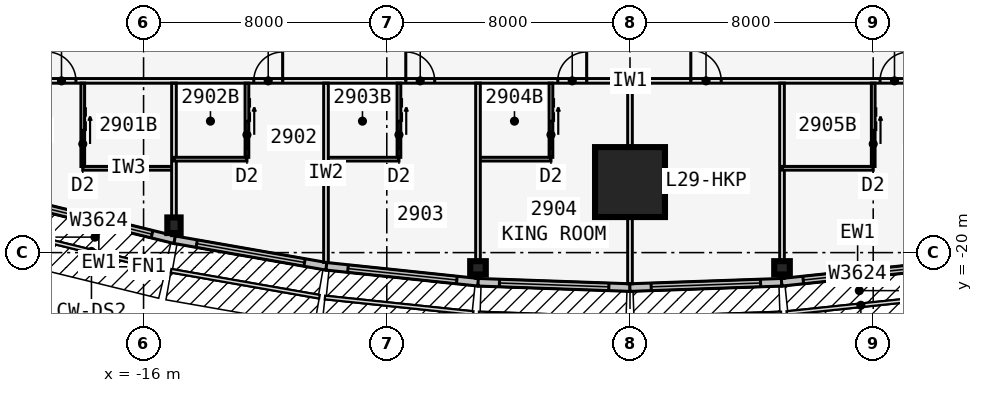
"""IFC4 building model, lengths in metres.
Left out: names, types, materials, properties, quantities, classifications, styles, units other than length and angle.
Written with IfcOpenShell. Run it as: python <this file> out.ifc"""

import sys

from ifc_helpers import new_model, si_unit, direction, frame, frame_2d, origin, origin_2d, place, context, subcontext, project, spatial, rectangle, i_section, extrude, element, fill, save


model = new_model("IFC4")
c1 = context("Model", 3, precision=1e-05, world=origin(), true_north=direction((0.0, 1.0)))
c2 = subcontext(c1, "Body", "Model", "MODEL_VIEW")
j1 = project(units=[si_unit("LENGTHUNIT", "METRE"), si_unit("PLANEANGLEUNIT", "RADIAN")], contexts=[c1])
p1 = place(None, origin())
s1 = spatial("IfcSite", under=j1, at=p1, CompositionType="ELEMENT")
p2 = place(p1, origin())
s2 = spatial("IfcBuilding", under=s1, at=p2, CompositionType="ELEMENT")
p3 = place(p2, frame((0.0, 0.0, 114.7)))
s3 = spatial("IfcBuildingStorey", under=s2, at=p3, CompositionType="ELEMENT", Elevation=114.7)
for number, where, z_axis, x_axis in (
    (1, (-15.0, -19.1, 0.0), (0.0, 0.0, 1.0), (1.0, 0.0, 0.0)),
    (2, (-5.0, -20.5, 0.0), (0.0, 0.0, 1.0), (0.0, -1.0, 0.0)),
    (3, (5.0, -20.5, 0.0), (0.0, 0.0, 1.0), (0.0, -1.0, 0.0)),
):
    element("IfcColumn", number, at=place(p3, frame(where, z_axis=z_axis, x_axis=x_axis)), inside=s3, PredefinedType="COLUMN", context=c2, shape_type="SweptSolid", body=[
        extrude(i_section(OverallWidth=0.437, OverallDepth=0.513, WebThickness=0.061, FlangeThickness=0.097, at=origin_2d()), origin(), (0.0, 0.0, 1.0), 3.4),
    ])
p4 = place(p3, frame((0.0, -17.68, 0.0), z_axis=(0.0, 0.0, 1.0), x_axis=(0.0, -1.0, 0.0)))
e4 = element("IfcColumn", 4, at=p4, inside=s3, PredefinedType="COLUMN", context=c2, shape_type="SweptSolid", body=[
    extrude(rectangle(XDim=2.3, YDim=2.3, at=origin_2d()), origin(), (0.0, 0.0, 1.0), 3.4),
])
p5 = place(p3, frame((-19.97, -18.354, 0.0), z_axis=(0.0, 0.0, 1.0), x_axis=(0.971270024053, -0.237980126011, 0.0)))
e5 = element("IfcWall", 5, at=p5, inside=s3, PredefinedType="STANDARD", context=c2, shape_type="SweptSolid", body=[
    extrude(rectangle(XDim=5.148, YDim=0.25, at=frame_2d((2.574, 0.0))), origin(), (0.0, 0.0, 1.0), 3.235),
])
p6 = place(p5, frame((0.774, 0.0, 0.45)))
e6 = element("IfcOpeningElement", 6, at=p6, cuts=e5, PredefinedType="OPENING", context=c2, shape_type="SweptSolid", body=[
    extrude(rectangle(XDim=3.6, YDim=2.4, at=frame_2d((1.8, 1.2))), frame((0.0, 0.135, 0.0), z_axis=(0.0, -1.0, 0.0), x_axis=(1.0, 0.0, 0.0)), (0.0, 0.0, 1.0), 0.27),
])
p7 = place(p3, frame((-14.979, -19.577, 0.0), z_axis=(0.0, 0.0, 1.0), x_axis=(0.985030467156, -0.172380331752, 0.0)))
e7 = element("IfcWall", 7, at=p7, inside=s3, PredefinedType="STANDARD", context=c2, shape_type="SweptSolid", body=[
    extrude(rectangle(XDim=5.076, YDim=0.25, at=frame_2d((2.538, 0.0))), origin(), (0.0, 0.0, 1.0), 3.235),
])
p8 = place(p7, frame((0.738, 0.0, 0.45)))
e8 = element("IfcOpeningElement", 8, at=p8, cuts=e7, PredefinedType="OPENING", context=c2, shape_type="SweptSolid", body=[
    extrude(rectangle(XDim=3.6, YDim=2.4, at=frame_2d((1.8, 1.2))), frame((0.0, 0.135, 0.0), z_axis=(0.0, -1.0, 0.0), x_axis=(1.0, 0.0, 0.0)), (0.0, 0.0, 1.0), 0.27),
])
p9 = place(p3, frame((-9.987, -20.451, 0.0), z_axis=(0.0, 0.0, 1.0), x_axis=(0.994534683851, -0.104406717299, 0.0)))
e9 = element("IfcWall", 9, at=p9, inside=s3, PredefinedType="STANDARD", context=c2, shape_type="SweptSolid", body=[
    extrude(rectangle(XDim=5.028, YDim=0.25, at=frame_2d((2.514, 0.0))), origin(), (0.0, 0.0, 1.0), 3.235),
])
p10 = place(p9, frame((0.714, 0.0, 0.45)))
e10 = element("IfcOpeningElement", 10, at=p10, cuts=e9, PredefinedType="OPENING", context=c2, shape_type="SweptSolid", body=[
    extrude(rectangle(XDim=3.6, YDim=2.4, at=frame_2d((1.8, 1.2))), frame((0.0, 0.135, 0.0), z_axis=(0.0, -1.0, 0.0), x_axis=(1.0, 0.0, 0.0)), (0.0, 0.0, 1.0), 0.27),
])
p11 = place(p3, frame((-4.996, -20.975, 0.0), z_axis=(0.0, 0.0, 1.0), x_axis=(0.999387720943, -0.034988329879, 0.0)))
e11 = element("IfcWall", 11, at=p11, inside=s3, PredefinedType="STANDARD", context=c2, shape_type="SweptSolid", body=[
    extrude(rectangle(XDim=5.003, YDim=0.25, at=frame_2d((2.501, 0.0))), origin(), (0.0, 0.0, 1.0), 3.235),
])
p12 = place(p11, frame((0.701, 0.0, 0.45)))
e12 = element("IfcOpeningElement", 12, at=p12, cuts=e11, PredefinedType="OPENING", context=c2, shape_type="SweptSolid", body=[
    extrude(rectangle(XDim=3.6, YDim=2.4, at=frame_2d((1.8, 1.2))), frame((0.0, 0.135, 0.0), z_axis=(0.0, -1.0, 0.0), x_axis=(1.0, 0.0, 0.0)), (0.0, 0.0, 1.0), 0.27),
])
p13 = place(p3, frame((-0.004, -21.15, 0.0), z_axis=(0.0, 0.0, 1.0), x_axis=(0.999387720943, 0.034988329879, 0.0)))
e13 = element("IfcWall", 13, at=p13, inside=s3, PredefinedType="STANDARD", context=c2, shape_type="SweptSolid", body=[
    extrude(rectangle(XDim=5.003, YDim=0.25, at=frame_2d((2.501, 0.0))), origin(), (0.0, 0.0, 1.0), 3.235),
])
p14 = place(p13, frame((0.701, 0.0, 0.45)))
e14 = element("IfcOpeningElement", 14, at=p14, cuts=e13, PredefinedType="OPENING", context=c2, shape_type="SweptSolid", body=[
    extrude(rectangle(XDim=3.6, YDim=2.4, at=frame_2d((1.8, 1.2))), frame((0.0, 0.135, 0.0), z_axis=(0.0, -1.0, 0.0), x_axis=(1.0, 0.0, 0.0)), (0.0, 0.0, 1.0), 0.27),
])
p15 = place(p3, frame((4.987, -20.976, 0.0), z_axis=(0.0, 0.0, 1.0), x_axis=(0.994534683851, 0.104406717299, 0.0)))
e15 = element("IfcWall", 15, at=p15, inside=s3, PredefinedType="STANDARD", context=c2, shape_type="SweptSolid", body=[
    extrude(rectangle(XDim=5.028, YDim=0.25, at=frame_2d((2.514, 0.0))), origin(), (0.0, 0.0, 1.0), 3.235),
])
p16 = place(p15, frame((0.714, 0.0, 0.45)))
e16 = element("IfcOpeningElement", 16, at=p16, cuts=e15, PredefinedType="OPENING", context=c2, shape_type="SweptSolid", body=[
    extrude(rectangle(XDim=3.6, YDim=2.4, at=frame_2d((1.8, 1.2))), frame((0.0, 0.135, 0.0), z_axis=(0.0, -1.0, 0.0), x_axis=(1.0, 0.0, 0.0)), (0.0, 0.0, 1.0), 0.27),
])
p17 = place(p3, frame((-23.857, -14.351, 0.0), z_axis=(0.0, 0.0, 1.0), x_axis=(1.0, 0.0, 0.0)))
e17 = element("IfcWall", 17, at=p17, inside=s3, PredefinedType="PARTITIONING", context=c2, shape_type="SweptSolid", body=[
    extrude(rectangle(XDim=47.714, YDim=0.15, at=frame_2d((23.857, 0.0))), origin(), (0.0, 0.0, 1.0), 3.235),
])
p18 = place(p17, frame((4.682, 0.0, 0.0)))
e18 = element("IfcOpeningElement", 18, at=p18, cuts=e17, PredefinedType="OPENING", context=c2, shape_type="SweptSolid", body=[
    extrude(rectangle(XDim=0.95, YDim=2.13, at=frame_2d((0.475, 1.065))), frame((0.0, 0.085, 0.0), z_axis=(0.0, -1.0, 0.0), x_axis=(1.0, 0.0, 0.0)), (0.0, 0.0, 1.0), 0.17),
])
p19 = place(p17, frame((11.482, 0.0, 0.0)))
e19 = element("IfcOpeningElement", 19, at=p19, cuts=e17, PredefinedType="OPENING", context=c2, shape_type="SweptSolid", body=[
    extrude(rectangle(XDim=0.95, YDim=2.13, at=frame_2d((0.475, 1.065))), frame((0.0, 0.085, 0.0), z_axis=(0.0, -1.0, 0.0), x_axis=(1.0, 0.0, 0.0)), (0.0, 0.0, 1.0), 0.17),
])
p20 = place(p17, frame((16.482, 0.0, 0.0)))
e20 = element("IfcOpeningElement", 20, at=p20, cuts=e17, PredefinedType="OPENING", context=c2, shape_type="SweptSolid", body=[
    extrude(rectangle(XDim=0.95, YDim=2.13, at=frame_2d((0.475, 1.065))), frame((0.0, 0.085, 0.0), z_axis=(0.0, -1.0, 0.0), x_axis=(1.0, 0.0, 0.0)), (0.0, 0.0, 1.0), 0.17),
])
p21 = place(p17, frame((21.482, 0.0, 0.0)))
e21 = element("IfcOpeningElement", 21, at=p21, cuts=e17, PredefinedType="OPENING", context=c2, shape_type="SweptSolid", body=[
    extrude(rectangle(XDim=0.95, YDim=2.13, at=frame_2d((0.475, 1.065))), frame((0.0, 0.085, 0.0), z_axis=(0.0, -1.0, 0.0), x_axis=(1.0, 0.0, 0.0)), (0.0, 0.0, 1.0), 0.17),
])
p22 = place(p17, frame((25.857, 0.0, 0.0)))
e22 = element("IfcOpeningElement", 22, at=p22, cuts=e17, PredefinedType="OPENING", context=c2, shape_type="SweptSolid", body=[
    extrude(rectangle(XDim=1.0, YDim=2.13, at=frame_2d((0.5, 1.065))), frame((0.0, 0.085, 0.0), z_axis=(0.0, -1.0, 0.0), x_axis=(1.0, 0.0, 0.0)), (0.0, 0.0, 1.0), 0.17),
])
p23 = place(p17, frame((32.082, 0.0, 0.0)))
e23 = element("IfcOpeningElement", 23, at=p23, cuts=e17, PredefinedType="OPENING", context=c2, shape_type="SweptSolid", body=[
    extrude(rectangle(XDim=0.95, YDim=2.13, at=frame_2d((0.475, 1.065))), frame((0.0, 0.085, 0.0), z_axis=(0.0, -1.0, 0.0), x_axis=(1.0, 0.0, 0.0)), (0.0, 0.0, 1.0), 0.17),
])
p24 = place(p17, frame((42.082, 0.0, 0.0)))
e24 = element("IfcOpeningElement", 24, at=p24, cuts=e17, PredefinedType="OPENING", context=c2, shape_type="SweptSolid", body=[
    extrude(rectangle(XDim=0.95, YDim=2.13, at=frame_2d((0.475, 1.065))), frame((0.0, 0.085, 0.0), z_axis=(0.0, -1.0, 0.0), x_axis=(1.0, 0.0, 0.0)), (0.0, 0.0, 1.0), 0.17),
])
p25 = place(p3, frame((-15.0, -14.426, 0.0), z_axis=(0.0, 0.0, 1.0), x_axis=(0.0, -1.0, 0.0)))
e25 = element("IfcWall", 25, at=p25, inside=s3, PredefinedType="PARTITIONING", context=c2, shape_type="SweptSolid", body=[
    extrude(rectangle(XDim=5.017, YDim=0.15, at=frame_2d((2.508, 0.0))), origin(), (0.0, 0.0, 1.0), 2.389),
])
p26 = place(p3, frame((-10.0, -14.426, 0.0), z_axis=(0.0, 0.0, 1.0), x_axis=(0.0, -1.0, 0.0)))
e26 = element("IfcWall", 26, at=p26, inside=s3, PredefinedType="PARTITIONING", context=c2, shape_type="SweptSolid", body=[
    extrude(rectangle(XDim=5.895, YDim=0.15, at=frame_2d((2.948, 0.0))), origin(), (0.0, 0.0, 1.0), 2.389),
])
p27 = place(p3, frame((-5.0, -14.426, 0.0), z_axis=(0.0, 0.0, 1.0), x_axis=(0.0, -1.0, 0.0)))
e27 = element("IfcWall", 27, at=p27, inside=s3, PredefinedType="PARTITIONING", context=c2, shape_type="SweptSolid", body=[
    extrude(rectangle(XDim=6.423, YDim=0.15, at=frame_2d((3.211, 0.0))), origin(), (0.0, 0.0, 1.0), 2.389),
])
p28 = place(p3, frame((0.0, -14.426, 0.0), z_axis=(0.0, 0.0, 1.0), x_axis=(0.0, -1.0, 0.0)))
e28 = element("IfcWall", 28, at=p28, inside=s3, PredefinedType="PARTITIONING", context=c2, shape_type="SweptSolid", body=[
    extrude(rectangle(XDim=6.599, YDim=0.15, at=frame_2d((3.299, 0.0))), origin(), (0.0, 0.0, 1.0), 2.389),
])
p29 = place(p3, frame((5.0, -14.426, 0.0), z_axis=(0.0, 0.0, 1.0), x_axis=(0.0, -1.0, 0.0)))
e29 = element("IfcWall", 29, at=p29, inside=s3, PredefinedType="PARTITIONING", context=c2, shape_type="SweptSolid", body=[
    extrude(rectangle(XDim=6.423, YDim=0.15, at=frame_2d((3.211, 0.0))), origin(), (0.0, 0.0, 1.0), 2.389),
])
p30 = place(p3, frame((-18.0, -17.226, 0.0), z_axis=(0.0, 0.0, 1.0), x_axis=(1.0, 0.0, 0.0)))
e30 = element("IfcWall", 30, at=p30, inside=s3, PredefinedType="PLUMBINGWALL", context=c2, shape_type="SweptSolid", body=[
    extrude(rectangle(XDim=3.0, YDim=0.12, at=frame_2d((1.5, 0.0))), origin(), (0.0, 0.0, 1.0), 3.235),
])
p31 = place(p3, frame((-18.0, -14.426, 0.0), z_axis=(0.0, 0.0, 1.0), x_axis=(0.0, -1.0, 0.0)))
e31 = element("IfcWall", 31, at=p31, inside=s3, PredefinedType="PLUMBINGWALL", context=c2, shape_type="SweptSolid", body=[
    extrude(rectangle(XDim=2.74, YDim=0.12, at=frame_2d((1.37, 0.0))), origin(), (0.0, 0.0, 1.0), 3.235),
])
p32 = place(p31, frame((1.55, 0.0, 0.0)))
e32 = element("IfcOpeningElement", 32, at=p32, cuts=e31, PredefinedType="OPENING", context=c2, shape_type="SweptSolid", body=[
    extrude(rectangle(XDim=0.9, YDim=2.13, at=frame_2d((0.45, 1.065))), frame((0.0, 0.07, 0.0), z_axis=(0.0, -1.0, 0.0), x_axis=(1.0, 0.0, 0.0)), (0.0, 0.0, 1.0), 0.14),
])
p33 = place(p3, frame((-15.0, -16.926, 0.0), z_axis=(0.0, 0.0, 1.0), x_axis=(1.0, 0.0, 0.0)))
e33 = element("IfcWall", 33, at=p33, inside=s3, PredefinedType="PLUMBINGWALL", context=c2, shape_type="SweptSolid", body=[
    extrude(rectangle(XDim=2.4, YDim=0.12, at=frame_2d((1.2, 0.0))), origin(), (0.0, 0.0, 1.0), 3.235),
])
p34 = place(p3, frame((-12.6, -14.426, 0.0), z_axis=(0.0, 0.0, 1.0), x_axis=(0.0, -1.0, 0.0)))
e34 = element("IfcWall", 34, at=p34, inside=s3, PredefinedType="PLUMBINGWALL", context=c2, shape_type="SweptSolid", body=[
    extrude(rectangle(XDim=2.44, YDim=0.12, at=frame_2d((1.22, 0.0))), origin(), (0.0, 0.0, 1.0), 3.235),
])
p35 = place(p34, frame((1.25, 0.0, 0.0)))
e35 = element("IfcOpeningElement", 35, at=p35, cuts=e34, PredefinedType="OPENING", context=c2, shape_type="SweptSolid", body=[
    extrude(rectangle(XDim=0.9, YDim=2.13, at=frame_2d((0.45, 1.065))), frame((0.0, 0.07, 0.0), z_axis=(0.0, -1.0, 0.0), x_axis=(1.0, 0.0, 0.0)), (0.0, 0.0, 1.0), 0.14),
])
p36 = place(p3, frame((-10.0, -16.926, 0.0), z_axis=(0.0, 0.0, 1.0), x_axis=(1.0, 0.0, 0.0)))
e36 = element("IfcWall", 36, at=p36, inside=s3, PredefinedType="PLUMBINGWALL", context=c2, shape_type="SweptSolid", body=[
    extrude(rectangle(XDim=2.4, YDim=0.12, at=frame_2d((1.2, 0.0))), origin(), (0.0, 0.0, 1.0), 3.235),
])
p37 = place(p3, frame((-7.6, -14.426, 0.0), z_axis=(0.0, 0.0, 1.0), x_axis=(0.0, -1.0, 0.0)))
e37 = element("IfcWall", 37, at=p37, inside=s3, PredefinedType="PLUMBINGWALL", context=c2, shape_type="SweptSolid", body=[
    extrude(rectangle(XDim=2.44, YDim=0.12, at=frame_2d((1.22, 0.0))), origin(), (0.0, 0.0, 1.0), 3.235),
])
p38 = place(p37, frame((1.25, 0.0, 0.0)))
e38 = element("IfcOpeningElement", 38, at=p38, cuts=e37, PredefinedType="OPENING", context=c2, shape_type="SweptSolid", body=[
    extrude(rectangle(XDim=0.9, YDim=2.13, at=frame_2d((0.45, 1.065))), frame((0.0, 0.07, 0.0), z_axis=(0.0, -1.0, 0.0), x_axis=(1.0, 0.0, 0.0)), (0.0, 0.0, 1.0), 0.14),
])
p39 = place(p3, frame((-5.0, -16.926, 0.0), z_axis=(0.0, 0.0, 1.0), x_axis=(1.0, 0.0, 0.0)))
e39 = element("IfcWall", 39, at=p39, inside=s3, PredefinedType="PLUMBINGWALL", context=c2, shape_type="SweptSolid", body=[
    extrude(rectangle(XDim=2.4, YDim=0.12, at=frame_2d((1.2, 0.0))), origin(), (0.0, 0.0, 1.0), 3.235),
])
p40 = place(p3, frame((-2.6, -14.426, 0.0), z_axis=(0.0, 0.0, 1.0), x_axis=(0.0, -1.0, 0.0)))
e40 = element("IfcWall", 40, at=p40, inside=s3, PredefinedType="PLUMBINGWALL", context=c2, shape_type="SweptSolid", body=[
    extrude(rectangle(XDim=2.44, YDim=0.12, at=frame_2d((1.22, 0.0))), origin(), (0.0, 0.0, 1.0), 3.235),
])
p41 = place(p40, frame((1.25, 0.0, 0.0)))
e41 = element("IfcOpeningElement", 41, at=p41, cuts=e40, PredefinedType="OPENING", context=c2, shape_type="SweptSolid", body=[
    extrude(rectangle(XDim=0.9, YDim=2.13, at=frame_2d((0.45, 1.065))), frame((0.0, 0.07, 0.0), z_axis=(0.0, -1.0, 0.0), x_axis=(1.0, 0.0, 0.0)), (0.0, 0.0, 1.0), 0.14),
])
p42 = place(p3, frame((5.0, -17.226, 0.0), z_axis=(0.0, 0.0, 1.0), x_axis=(1.0, 0.0, 0.0)))
e42 = element("IfcWall", 42, at=p42, inside=s3, PredefinedType="PLUMBINGWALL", context=c2, shape_type="SweptSolid", body=[
    extrude(rectangle(XDim=3.0, YDim=0.12, at=frame_2d((1.5, 0.0))), origin(), (0.0, 0.0, 1.0), 3.235),
])
p43 = place(p3, frame((8.0, -14.426, 0.0), z_axis=(0.0, 0.0, 1.0), x_axis=(0.0, -1.0, 0.0)))
e43 = element("IfcWall", 43, at=p43, inside=s3, PredefinedType="PLUMBINGWALL", context=c2, shape_type="SweptSolid", body=[
    extrude(rectangle(XDim=2.74, YDim=0.12, at=frame_2d((1.37, 0.0))), origin(), (0.0, 0.0, 1.0), 3.235),
])
p44 = place(p43, frame((1.55, 0.0, 0.0)))
e44 = element("IfcOpeningElement", 44, at=p44, cuts=e43, PredefinedType="OPENING", context=c2, shape_type="SweptSolid", body=[
    extrude(rectangle(XDim=0.9, YDim=2.13, at=frame_2d((0.45, 1.065))), frame((0.0, 0.07, 0.0), z_axis=(0.0, -1.0, 0.0), x_axis=(1.0, 0.0, 0.0)), (0.0, 0.0, 1.0), 0.14),
])
p45 = place(p6, origin())
e45 = element("IfcWindow", 45, at=p45, inside=s3, PartitioningType="SINGLE_PANEL", PredefinedType="WINDOW", context=c2, shape_type="SweptSolid", body=[
    extrude(rectangle(XDim=3.6, YDim=2.4, at=frame_2d((1.8, 1.2))), frame((0.0, 0.03, 0.0), z_axis=(0.0, -1.0, 0.0), x_axis=(1.0, 0.0, 0.0)), (0.0, 0.0, 1.0), 0.06),
])
fill(e6, e45)
p46 = place(p8, origin())
e46 = element("IfcWindow", 46, at=p46, inside=s3, PartitioningType="SINGLE_PANEL", PredefinedType="WINDOW", context=c2, shape_type="SweptSolid", body=[
    extrude(rectangle(XDim=3.6, YDim=2.4, at=frame_2d((1.8, 1.2))), frame((0.0, 0.03, 0.0), z_axis=(0.0, -1.0, 0.0), x_axis=(1.0, 0.0, 0.0)), (0.0, 0.0, 1.0), 0.06),
])
fill(e8, e46)
p47 = place(p10, origin())
e47 = element("IfcWindow", 47, at=p47, inside=s3, PartitioningType="SINGLE_PANEL", PredefinedType="WINDOW", context=c2, shape_type="SweptSolid", body=[
    extrude(rectangle(XDim=3.6, YDim=2.4, at=frame_2d((1.8, 1.2))), frame((0.0, 0.03, 0.0), z_axis=(0.0, -1.0, 0.0), x_axis=(1.0, 0.0, 0.0)), (0.0, 0.0, 1.0), 0.06),
])
fill(e10, e47)
p48 = place(p12, origin())
e48 = element("IfcWindow", 48, at=p48, inside=s3, PartitioningType="SINGLE_PANEL", PredefinedType="WINDOW", context=c2, shape_type="SweptSolid", body=[
    extrude(rectangle(XDim=3.6, YDim=2.4, at=frame_2d((1.8, 1.2))), frame((0.0, 0.03, 0.0), z_axis=(0.0, -1.0, 0.0), x_axis=(1.0, 0.0, 0.0)), (0.0, 0.0, 1.0), 0.06),
])
fill(e12, e48)
p49 = place(p14, origin())
e49 = element("IfcWindow", 49, at=p49, inside=s3, PartitioningType="SINGLE_PANEL", PredefinedType="WINDOW", context=c2, shape_type="SweptSolid", body=[
    extrude(rectangle(XDim=3.6, YDim=2.4, at=frame_2d((1.8, 1.2))), frame((0.0, 0.03, 0.0), z_axis=(0.0, -1.0, 0.0), x_axis=(1.0, 0.0, 0.0)), (0.0, 0.0, 1.0), 0.06),
])
fill(e14, e49)
p50 = place(p16, origin())
e50 = element("IfcWindow", 50, at=p50, inside=s3, PartitioningType="SINGLE_PANEL", PredefinedType="WINDOW", context=c2, shape_type="SweptSolid", body=[
    extrude(rectangle(XDim=3.6, YDim=2.4, at=frame_2d((1.8, 1.2))), frame((0.0, 0.03, 0.0), z_axis=(0.0, -1.0, 0.0), x_axis=(1.0, 0.0, 0.0)), (0.0, 0.0, 1.0), 0.06),
])
fill(e16, e50)
p51 = place(p32, origin())
e51 = element("IfcDoor", 51, at=p51, inside=s3, OperationType="SLIDING_TO_LEFT", PredefinedType="DOOR", context=c2, shape_type="SweptSolid", body=[
    extrude(rectangle(XDim=0.9, YDim=2.13, at=frame_2d((0.45, 1.065))), frame((0.0, 0.025, 0.0), z_axis=(0.0, -1.0, 0.0), x_axis=(1.0, 0.0, 0.0)), (0.0, 0.0, 1.0), 0.05),
])
fill(e32, e51)
p52 = place(p18, origin())
e52 = element("IfcDoor", 52, at=p52, inside=s3, OperationType="SINGLE_SWING_LEFT", PredefinedType="DOOR", context=c2, shape_type="SweptSolid", body=[
    extrude(rectangle(XDim=0.95, YDim=2.13, at=frame_2d((0.475, 1.065))), frame((0.0, 0.025, 0.0), z_axis=(0.0, -1.0, 0.0), x_axis=(1.0, 0.0, 0.0)), (0.0, 0.0, 1.0), 0.05),
])
fill(e18, e52)
p53 = place(p35, origin())
e53 = element("IfcDoor", 53, at=p53, inside=s3, OperationType="SLIDING_TO_LEFT", PredefinedType="DOOR", context=c2, shape_type="SweptSolid", body=[
    extrude(rectangle(XDim=0.9, YDim=2.13, at=frame_2d((0.45, 1.065))), frame((0.0, 0.025, 0.0), z_axis=(0.0, -1.0, 0.0), x_axis=(1.0, 0.0, 0.0)), (0.0, 0.0, 1.0), 0.05),
])
fill(e35, e53)
p54 = place(p19, origin())
e54 = element("IfcDoor", 54, at=p54, inside=s3, OperationType="SINGLE_SWING_RIGHT", PredefinedType="DOOR", context=c2, shape_type="SweptSolid", body=[
    extrude(rectangle(XDim=0.95, YDim=2.13, at=frame_2d((0.475, 1.065))), frame((0.0, 0.025, 0.0), z_axis=(0.0, -1.0, 0.0), x_axis=(1.0, 0.0, 0.0)), (0.0, 0.0, 1.0), 0.05),
])
fill(e19, e54)
p55 = place(p38, origin())
e55 = element("IfcDoor", 55, at=p55, inside=s3, OperationType="SLIDING_TO_LEFT", PredefinedType="DOOR", context=c2, shape_type="SweptSolid", body=[
    extrude(rectangle(XDim=0.9, YDim=2.13, at=frame_2d((0.45, 1.065))), frame((0.0, 0.025, 0.0), z_axis=(0.0, -1.0, 0.0), x_axis=(1.0, 0.0, 0.0)), (0.0, 0.0, 1.0), 0.05),
])
fill(e38, e55)
p56 = place(p20, origin())
e56 = element("IfcDoor", 56, at=p56, inside=s3, OperationType="SINGLE_SWING_LEFT", PredefinedType="DOOR", context=c2, shape_type="SweptSolid", body=[
    extrude(rectangle(XDim=0.95, YDim=2.13, at=frame_2d((0.475, 1.065))), frame((0.0, 0.025, 0.0), z_axis=(0.0, -1.0, 0.0), x_axis=(1.0, 0.0, 0.0)), (0.0, 0.0, 1.0), 0.05),
])
fill(e20, e56)
p57 = place(p41, origin())
e57 = element("IfcDoor", 57, at=p57, inside=s3, OperationType="SLIDING_TO_LEFT", PredefinedType="DOOR", context=c2, shape_type="SweptSolid", body=[
    extrude(rectangle(XDim=0.9, YDim=2.13, at=frame_2d((0.45, 1.065))), frame((0.0, 0.025, 0.0), z_axis=(0.0, -1.0, 0.0), x_axis=(1.0, 0.0, 0.0)), (0.0, 0.0, 1.0), 0.05),
])
fill(e41, e57)
p58 = place(p21, origin())
e58 = element("IfcDoor", 58, at=p58, inside=s3, OperationType="SINGLE_SWING_RIGHT", PredefinedType="DOOR", context=c2, shape_type="SweptSolid", body=[
    extrude(rectangle(XDim=0.95, YDim=2.13, at=frame_2d((0.475, 1.065))), frame((0.0, 0.025, 0.0), z_axis=(0.0, -1.0, 0.0), x_axis=(1.0, 0.0, 0.0)), (0.0, 0.0, 1.0), 0.05),
])
fill(e21, e58)
p59 = place(p22, origin())
e59 = element("IfcDoor", 59, at=p59, inside=s3, OperationType="SINGLE_SWING_LEFT", PredefinedType="DOOR", context=c2, shape_type="SweptSolid", body=[
    extrude(rectangle(XDim=1.0, YDim=2.13, at=frame_2d((0.5, 1.065))), frame((0.0, 0.025, 0.0), z_axis=(0.0, -1.0, 0.0), x_axis=(1.0, 0.0, 0.0)), (0.0, 0.0, 1.0), 0.05),
])
fill(e22, e59)
p60 = place(p44, origin())
e60 = element("IfcDoor", 60, at=p60, inside=s3, OperationType="SLIDING_TO_LEFT", PredefinedType="DOOR", context=c2, shape_type="SweptSolid", body=[
    extrude(rectangle(XDim=0.9, YDim=2.13, at=frame_2d((0.45, 1.065))), frame((0.0, 0.025, 0.0), z_axis=(0.0, -1.0, 0.0), x_axis=(1.0, 0.0, 0.0)), (0.0, 0.0, 1.0), 0.05),
])
fill(e44, e60)
p61 = place(p23, origin())
e61 = element("IfcDoor", 61, at=p61, inside=s3, OperationType="SINGLE_SWING_RIGHT", PredefinedType="DOOR", context=c2, shape_type="SweptSolid", body=[
    extrude(rectangle(XDim=0.95, YDim=2.13, at=frame_2d((0.475, 1.065))), frame((0.0, 0.025, 0.0), z_axis=(0.0, -1.0, 0.0), x_axis=(1.0, 0.0, 0.0)), (0.0, 0.0, 1.0), 0.05),
])
fill(e23, e61)
save(model, sys.argv[1])
